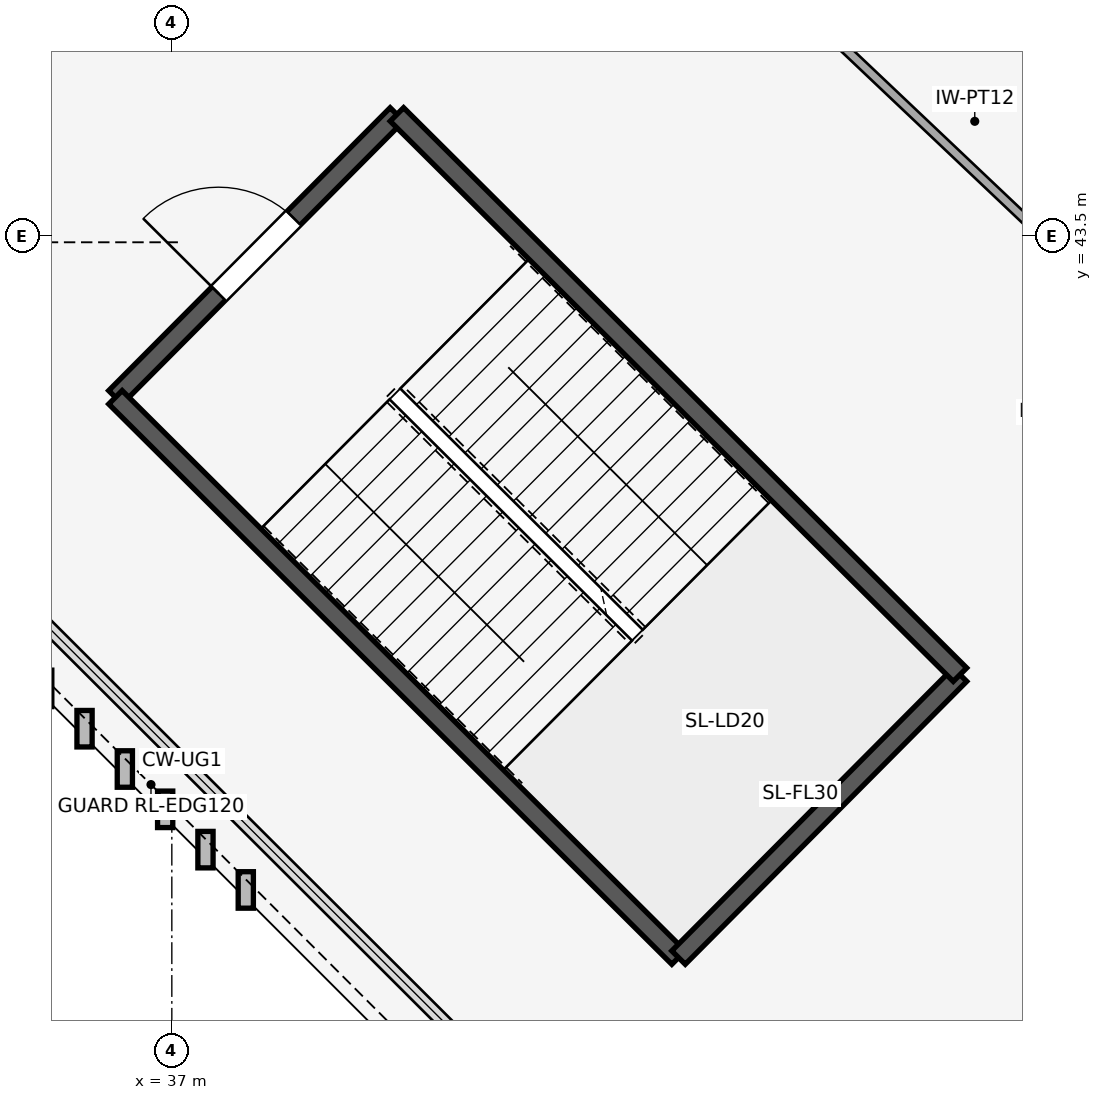
"""IFC4 building model, lengths in metres.
Left out: names, types, materials, properties, quantities, classifications, styles, units other than length and angle.
Written with IfcOpenShell. Run it as: python <this file> out.ifc"""

import sys

from ifc_helpers import new_model, si_unit, direction, frame, frame_2d, origin, place, context, subcontext, project, spatial, rectangle, extrude, element, fill, save


model = new_model("IFC4")
c1 = context("Model", 3, precision=1e-05, world=origin(), true_north=direction((0.0, 1.0)))
c2 = subcontext(c1, "Body", "Model", "MODEL_VIEW")
j1 = project(units=[si_unit("LENGTHUNIT", "METRE"), si_unit("PLANEANGLEUNIT", "RADIAN")], contexts=[c1])
p1 = place(None, origin())
s1 = spatial("IfcSite", under=j1, at=p1, CompositionType="ELEMENT")
p2 = place(p1, origin())
s2 = spatial("IfcBuilding", under=s1, at=p2, CompositionType="ELEMENT")
p3 = place(p2, frame((0.0, 0.0, 5.4)))
s3 = spatial("IfcBuildingStorey", under=s2, at=p3, CompositionType="ELEMENT", Elevation=5.4)
p4 = place(p3, frame((39.961, 45.102, 0.0), z_axis=(0.0, 0.0, 1.0), x_axis=(-0.705314141126, -0.708894888067, 0.0)))
e1 = element("IfcWall", 1, at=p4, inside=s3, PredefinedType="SHEAR", context=c2, shape_type="SweptSolid", body=[
    extrude(rectangle(XDim=5.25, YDim=0.25, at=frame_2d((2.625, 0.0))), origin(), (0.0, 0.0, 1.0), 4.92),
])
p5 = place(p4, frame((1.925, 0.0, 0.0)))
e2 = element("IfcOpeningElement", 2, at=p5, cuts=e1, PredefinedType="OPENING", context=c2, shape_type="SweptSolid", body=[
    extrude(rectangle(XDim=1.4, YDim=2.2, at=frame_2d((0.7, 1.1))), frame((0.0, 0.135, 0.0), z_axis=(0.0, -1.0, 0.0), x_axis=(1.0, 0.0, 0.0)), (0.0, 0.0, 1.0), 0.27),
])
p6 = place(p3, frame((36.258, 41.38, 0.0), z_axis=(0.0, 0.0, 1.0), x_axis=(0.708891762409, -0.705317282639, 0.0)))
e3 = element("IfcWall", 3, at=p6, inside=s3, PredefinedType="SHEAR", context=c2, shape_type="SweptSolid", body=[
    extrude(rectangle(XDim=10.45, YDim=0.25, at=frame_2d((5.225, 0.0))), origin(), (0.0, 0.0, 1.0), 4.92),
])
p7 = place(p3, frame((43.666, 34.01, 0.0), z_axis=(0.0, 0.0, 1.0), x_axis=(0.705314141126, 0.708894888067, 0.0)))
e4 = element("IfcWall", 4, at=p7, inside=s3, PredefinedType="SHEAR", context=c2, shape_type="SweptSolid", body=[
    extrude(rectangle(XDim=5.25, YDim=0.25, at=frame_2d((2.625, 0.0))), origin(), (0.0, 0.0, 1.0), 4.92),
])
p8 = place(p3, frame((47.369, 37.731, 0.0), z_axis=(0.0, 0.0, 1.0), x_axis=(-0.708891762409, 0.705317282639, 0.0)))
e5 = element("IfcWall", 5, at=p8, inside=s3, PredefinedType="SHEAR", context=c2, shape_type="SweptSolid", body=[
    extrude(rectangle(XDim=10.45, YDim=0.25, at=frame_2d((5.225, 0.0))), origin(), (0.0, 0.0, 1.0), 4.92),
])
p9 = place(p3, frame((42.593, 49.059, 0.0), z_axis=(0.0, 0.0, 1.0), x_axis=(0.725964978713, -0.687731669826, 0.0)))
e6 = element("IfcWall", 6, at=p9, inside=s3, PredefinedType="PARTITIONING", context=c2, shape_type="SweptSolid", body=[
    extrude(rectangle(XDim=18.263, YDim=0.12, at=frame_2d((9.131, 0.0))), origin(), (0.0, 0.0, 1.0), 3.67),
])
p10 = place(p9, frame((8.291, 0.0, 0.0)))
e7 = element("IfcOpeningElement", 7, at=p10, cuts=e6, PredefinedType="OPENING", context=c2, shape_type="SweptSolid", body=[
    extrude(rectangle(XDim=1.68, YDim=2.24, at=frame_2d((0.84, 1.12))), frame((0.0, 0.07, 0.0), z_axis=(0.0, -1.0, 0.0), x_axis=(1.0, 0.0, 0.0)), (0.0, 0.0, 1.0), 0.14),
])
p11 = place(p5, frame((1.4, 0.0, 0.0), z_axis=(0.0, 0.0, 1.0), x_axis=(-1.0, 0.0, 0.0)))
e8 = element("IfcDoor", 8, at=p11, inside=s3, OperationType="SINGLE_SWING_LEFT", PredefinedType="DOOR", context=c2, shape_type="SweptSolid", body=[
    extrude(rectangle(XDim=1.4, YDim=2.2, at=frame_2d((0.7, 1.1))), frame((0.0, 0.025, 0.0), z_axis=(0.0, -1.0, 0.0), x_axis=(1.0, 0.0, 0.0)), (0.0, 0.0, 1.0), 0.05),
])
fill(e2, e8)
save(model, sys.argv[1])
